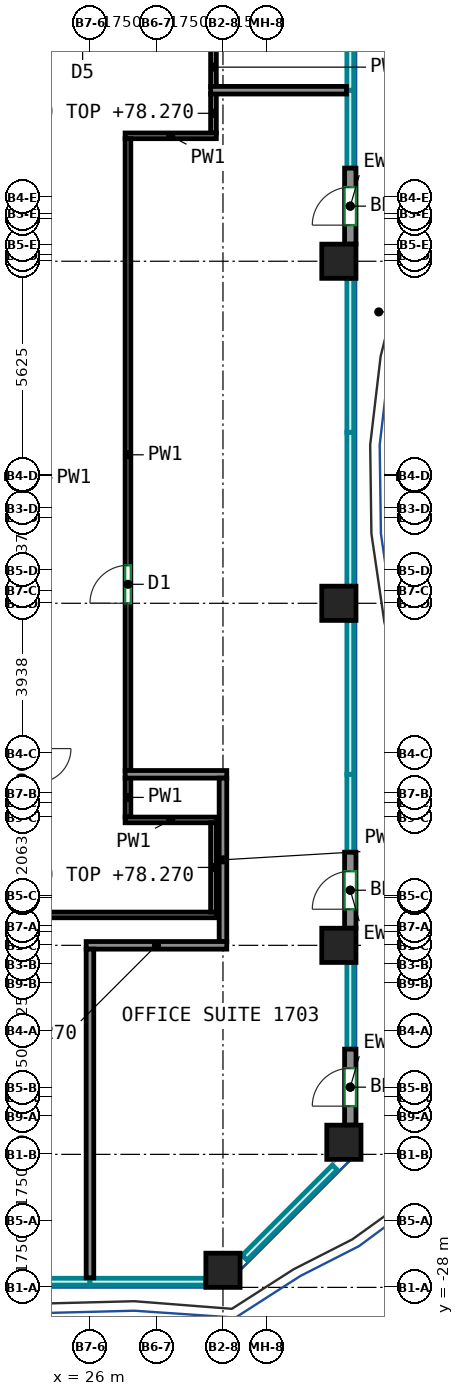
"""IFC4 building model, lengths in metres.
Left out: names, types, materials, properties, quantities, classifications, styles, units other than length and angle.
Written with IfcOpenShell. Run it as: python <this file> out.ifc"""

import sys

from ifc_helpers import new_model, si_unit, direction, frame, frame_2d, origin, origin_2d, place, context, subcontext, project, spatial, rectangle, extrude, source, transform, mapped, element, fill, save


model = new_model("IFC4")
c1 = context("Model", 3, precision=1e-05, world=origin(), true_north=direction((0.0, 1.0)))
c2 = subcontext(c1, "Body", "Model", "MODEL_VIEW")
j1 = project(units=[si_unit("LENGTHUNIT", "METRE"), si_unit("PLANEANGLEUNIT", "RADIAN")], contexts=[c1])
p1 = place(None, origin())
s1 = spatial("IfcSite", under=j1, at=p1, CompositionType="ELEMENT")
p2 = place(p1, origin())
s2 = spatial("IfcBuilding", under=s1, at=p2, CompositionType="ELEMENT")
p3 = place(p2, frame((0.0, 0.0, 75.2)))
s3 = spatial("IfcBuildingStorey", under=s2, at=p3, CompositionType="ELEMENT", Elevation=75.2)
m1 = source(origin(), c2, "Body", "SweptSolid", [
    extrude(rectangle(XDim=0.9, YDim=0.9, at=origin_2d()), origin(), (0.0, 0.0, 1.0), 3.72),
])
for number, where, z_axis, x_axis in (
    (1, (29.5, -27.55, 0.0), (0.0, 0.0, 1.0), (1.0, 0.0, 0.0)),
    (2, (32.55, -19.0, 0.0), (0.0, 0.0, 1.0), (1.0, 0.0, 0.0)),
    (3, (32.55, -10.0, 0.0), (0.0, 0.0, 1.0), (1.0, 0.0, 0.0)),
    (4, (32.55, -1.0, 0.0), (0.0, 0.0, 1.0), (1.0, 0.0, 0.0)),
    (5, (32.682, -24.182, 0.0), (0.0, 0.0, 1.0), (1.0, 0.0, 0.0)),
):
    element("IfcColumn", number, at=place(p3, frame(where, z_axis=z_axis, x_axis=x_axis)), inside=s3, PredefinedType="COLUMN", context=c2, shape_type="MappedRepresentation", body=[
        mapped(m1, transform((0.0, 0.0, 0.0))),
    ])
m2 = source(origin(), c2, "Body", "SweptSolid", [
    extrude(rectangle(XDim=2.0, YDim=0.3, at=frame_2d((1.0, 0.0))), origin(), (0.0, 0.0, 1.0), 3.72),
])
p4 = place(p3, frame((32.85, -23.732, 0.0), z_axis=(0.0, 0.0, 1.0), x_axis=(0.0, 1.0, 0.0)))
e6 = element("IfcWall", 6, at=p4, inside=s3, PredefinedType="SOLIDWALL", context=c2, shape_type="MappedRepresentation", body=[
    mapped(m2, transform((0.0, 0.0, 0.0))),
])
p5 = place(p4, frame((0.5, 0.0, 0.0)))
e7 = element("IfcOpeningElement", 7, at=p5, cuts=e6, PredefinedType="OPENING", context=c2, shape_type="SweptSolid", body=[
    extrude(rectangle(XDim=1.0, YDim=2.1, at=frame_2d((0.5, 1.05))), frame((0.0, 0.16, 0.0), z_axis=(0.0, -1.0, 0.0), x_axis=(1.0, 0.0, 0.0)), (0.0, 0.0, 1.0), 0.32),
])
p6 = place(p3, frame((32.85, -18.55, 0.0), z_axis=(0.0, 0.0, 1.0), x_axis=(0.0, 1.0, 0.0)))
e8 = element("IfcWall", 8, at=p6, inside=s3, PredefinedType="SOLIDWALL", context=c2, shape_type="MappedRepresentation", body=[
    mapped(m2, transform((0.0, 0.0, 0.0))),
])
p7 = place(p6, frame((0.5, 0.0, 0.0)))
e9 = element("IfcOpeningElement", 9, at=p7, cuts=e8, PredefinedType="OPENING", context=c2, shape_type="SweptSolid", body=[
    extrude(rectangle(XDim=1.0, YDim=2.1, at=frame_2d((0.5, 1.05))), frame((0.0, 0.16, 0.0), z_axis=(0.0, -1.0, 0.0), x_axis=(1.0, 0.0, 0.0)), (0.0, 0.0, 1.0), 0.32),
])
p8 = place(p3, frame((32.85, -0.55, 0.0), z_axis=(0.0, 0.0, 1.0), x_axis=(0.0, 1.0, 0.0)))
e10 = element("IfcWall", 10, at=p8, inside=s3, PredefinedType="SOLIDWALL", context=c2, shape_type="MappedRepresentation", body=[
    mapped(m2, transform((0.0, 0.0, 0.0))),
])
p9 = place(p8, frame((0.5, 0.0, 0.0)))
e11 = element("IfcOpeningElement", 11, at=p9, cuts=e10, PredefinedType="OPENING", context=c2, shape_type="SweptSolid", body=[
    extrude(rectangle(XDim=1.0, YDim=2.1, at=frame_2d((0.5, 1.05))), frame((0.0, 0.16, 0.0), z_axis=(0.0, -1.0, 0.0), x_axis=(1.0, 0.0, 0.0)), (0.0, 0.0, 1.0), 0.32),
])
p10 = place(p3, frame((-19.325, -18.2, 0.0), z_axis=(0.0, 0.0, 1.0), x_axis=(1.0, 0.0, 0.0)))
e12 = element("IfcWall", 12, at=p10, inside=s3, PredefinedType="PARTITIONING", context=c2, shape_type="SweptSolid", body=[
    extrude(rectangle(XDim=48.65, YDim=0.15, at=frame_2d((24.325, 0.0))), origin(), (0.0, 0.0, 1.0), 3.72),
])
p11 = place(p10, frame((12.221, 0.0, 0.0)))
e13 = element("IfcOpeningElement", 13, at=p11, cuts=e12, PredefinedType="OPENING", context=c2, shape_type="SweptSolid", body=[
    extrude(rectangle(XDim=0.9, YDim=2.1, at=frame_2d((0.45, 1.05))), frame((0.0, 0.085, 0.0), z_axis=(0.0, -1.0, 0.0), x_axis=(1.0, 0.0, 0.0)), (0.0, 0.0, 1.0), 0.17),
])
p12 = place(p10, frame((26.229, 0.0, 0.0)))
e14 = element("IfcOpeningElement", 14, at=p12, cuts=e12, PredefinedType="OPENING", context=c2, shape_type="SweptSolid", body=[
    extrude(rectangle(XDim=0.9, YDim=2.1, at=frame_2d((0.45, 1.05))), frame((0.0, 0.085, 0.0), z_axis=(0.0, -1.0, 0.0), x_axis=(1.0, 0.0, 0.0)), (0.0, 0.0, 1.0), 0.17),
])
p13 = place(p10, frame((38.029, 0.0, 0.0)))
e15 = element("IfcOpeningElement", 15, at=p13, cuts=e12, PredefinedType="OPENING", context=c2, shape_type="SweptSolid", body=[
    extrude(rectangle(XDim=0.9, YDim=2.1, at=frame_2d((0.45, 1.05))), frame((0.0, 0.085, 0.0), z_axis=(0.0, -1.0, 0.0), x_axis=(1.0, 0.0, 0.0)), (0.0, 0.0, 1.0), 0.17),
])
p14 = place(p3, frame((27.0, -15.625, 0.0), z_axis=(0.0, 0.0, 1.0), x_axis=(0.0, 1.0, 0.0)))
e16 = element("IfcWall", 16, at=p14, inside=s3, PredefinedType="PARTITIONING", context=c2, shape_type="SweptSolid", body=[
    extrude(rectangle(XDim=1.035, YDim=0.15, at=frame_2d((0.518, 0.0))), origin(), (0.0, 0.0, 1.0), 3.72),
])
p15 = place(p3, frame((26.925, -15.7, 0.0), z_axis=(0.0, 0.0, 1.0), x_axis=(1.0, 0.0, 0.0)))
e17 = element("IfcWall", 17, at=p15, inside=s3, PredefinedType="PARTITIONING", context=c2, shape_type="SweptSolid", body=[
    extrude(rectangle(XDim=2.4, YDim=0.15, at=frame_2d((1.2, 0.0))), origin(), (0.0, 0.0, 1.0), 3.72),
])
p16 = place(p3, frame((29.25, -18.125, 0.0), z_axis=(0.0, 0.0, 1.0), x_axis=(0.0, 1.0, 0.0)))
e18 = element("IfcWall", 18, at=p16, inside=s3, PredefinedType="PARTITIONING", context=c2, shape_type="SweptSolid", body=[
    extrude(rectangle(XDim=2.35, YDim=0.15, at=frame_2d((1.175, 0.0))), origin(), (0.0, 0.0, 1.0), 3.07),
])
for number, where, z_axis, x_axis in (
    (19, (29.25, 3.59, 0.0), (0.0, 0.0, 1.0), (0.0, 1.0, 0.0)),
    (20, (29.25, 2.375, 0.0), (0.0, 0.0, 1.0), (0.0, 1.0, 0.0)),
):
    element("IfcWall", number, at=place(p3, frame(where, z_axis=z_axis, x_axis=x_axis)), inside=s3, PredefinedType="PARTITIONING", context=c2, shape_type="SweptSolid", body=[
        extrude(rectangle(XDim=1.035, YDim=0.15, at=frame_2d((0.518, 0.0))), origin(), (0.0, 0.0, 1.0), 3.07),
    ])
p17 = place(p3, frame((26.925, 2.3, 0.0), z_axis=(0.0, 0.0, 1.0), x_axis=(1.0, 0.0, 0.0)))
e21 = element("IfcWall", 21, at=p17, inside=s3, PredefinedType="PARTITIONING", context=c2, shape_type="SweptSolid", body=[
    extrude(rectangle(XDim=2.4, YDim=0.15, at=frame_2d((1.2, 0.0))), origin(), (0.0, 0.0, 1.0), 3.72),
])
p18 = place(p3, frame((27.0, -14.41, 0.0), z_axis=(0.0, 0.0, 1.0), x_axis=(0.0, 1.0, 0.0)))
e22 = element("IfcWall", 22, at=p18, inside=s3, PredefinedType="PARTITIONING", context=c2, shape_type="SweptSolid", body=[
    extrude(rectangle(XDim=16.635, YDim=0.15, at=frame_2d((8.317, 0.0))), origin(), (0.0, 0.0, 1.0), 3.72),
])
p19 = place(p18, frame((4.41, 0.0, 0.0)))
e23 = element("IfcOpeningElement", 23, at=p19, cuts=e22, PredefinedType="OPENING", context=c2, shape_type="SweptSolid", body=[
    extrude(rectangle(XDim=1.0, YDim=2.1, at=frame_2d((0.5, 1.05))), frame((0.0, 0.085, 0.0), z_axis=(0.0, -1.0, 0.0), x_axis=(1.0, 0.0, 0.0)), (0.0, 0.0, 1.0), 0.17),
])
p20 = place(p3, frame((26.926, -14.5, 0.0), z_axis=(0.0, 0.0, 1.0), x_axis=(1.0, 0.0, 0.0)))
e24 = element("IfcWall", 24, at=p20, inside=s3, PredefinedType="PARTITIONING", context=c2, shape_type="SweptSolid", body=[
    extrude(rectangle(XDim=2.674, YDim=0.2, at=frame_2d((1.337, 0.0))), origin(), (0.0, 0.0, 1.0), 3.72),
])
p21 = place(p3, frame((29.5, -18.9, 0.0), z_axis=(0.0, 0.0, 1.0), x_axis=(0.0, 1.0, 0.0)))
e25 = element("IfcWall", 25, at=p21, inside=s3, PredefinedType="PARTITIONING", context=c2, shape_type="SweptSolid", body=[
    extrude(rectangle(XDim=4.3, YDim=0.2, at=frame_2d((2.15, 0.0))), origin(), (0.0, 0.0, 1.0), 3.07),
])
p22 = place(p3, frame((25.9, -19.0, 0.0), z_axis=(0.0, 0.0, 1.0), x_axis=(1.0, 0.0, 0.0)))
e26 = element("IfcWall", 26, at=p22, inside=s3, PredefinedType="PARTITIONING", context=c2, shape_type="SweptSolid", body=[
    extrude(rectangle(XDim=3.7, YDim=0.2, at=frame_2d((1.85, 0.0))), origin(), (0.0, 0.0, 1.0), 3.07),
])
p23 = place(p3, frame((26.0, -27.75, 0.0), z_axis=(0.0, 0.0, 1.0), x_axis=(0.0, 1.0, 0.0)))
e27 = element("IfcWall", 27, at=p23, inside=s3, PredefinedType="PARTITIONING", context=c2, shape_type="SweptSolid", body=[
    extrude(rectangle(XDim=8.65, YDim=0.2, at=frame_2d((4.325, 0.0))), origin(), (0.0, 0.0, 1.0), 3.72),
])
p24 = place(p3, frame((29.176, 3.5, 0.0), z_axis=(0.0, 0.0, 1.0), x_axis=(1.0, 0.0, 0.0)))
e28 = element("IfcWall", 28, at=p24, inside=s3, PredefinedType="PARTITIONING", context=c2, shape_type="SweptSolid", body=[
    extrude(rectangle(XDim=3.574, YDim=0.2, at=frame_2d((1.787, 0.0))), origin(), (0.0, 0.0, 1.0), 3.72),
])
p25 = place(p5, origin())
e29 = element("IfcDoor", 29, at=p25, inside=s3, OperationType="SINGLE_SWING_LEFT", PredefinedType="DOOR", context=c2, shape_type="SweptSolid", body=[
    extrude(rectangle(XDim=1.0, YDim=2.1, at=frame_2d((0.5, 1.05))), frame((0.0, 0.025, 0.0), z_axis=(0.0, -1.0, 0.0), x_axis=(1.0, 0.0, 0.0)), (0.0, 0.0, 1.0), 0.05),
])
fill(e7, e29)
p26 = place(p7, origin())
e30 = element("IfcDoor", 30, at=p26, inside=s3, OperationType="SINGLE_SWING_LEFT", PredefinedType="DOOR", context=c2, shape_type="SweptSolid", body=[
    extrude(rectangle(XDim=1.0, YDim=2.1, at=frame_2d((0.5, 1.05))), frame((0.0, 0.025, 0.0), z_axis=(0.0, -1.0, 0.0), x_axis=(1.0, 0.0, 0.0)), (0.0, 0.0, 1.0), 0.05),
])
fill(e9, e30)
p27 = place(p9, origin())
e31 = element("IfcDoor", 31, at=p27, inside=s3, OperationType="SINGLE_SWING_LEFT", PredefinedType="DOOR", context=c2, shape_type="SweptSolid", body=[
    extrude(rectangle(XDim=1.0, YDim=2.1, at=frame_2d((0.5, 1.05))), frame((0.0, 0.025, 0.0), z_axis=(0.0, -1.0, 0.0), x_axis=(1.0, 0.0, 0.0)), (0.0, 0.0, 1.0), 0.05),
])
fill(e11, e31)
p28 = place(p19, origin())
e32 = element("IfcDoor", 32, at=p28, inside=s3, OperationType="SINGLE_SWING_LEFT", PredefinedType="DOOR", context=c2, shape_type="SweptSolid", body=[
    extrude(rectangle(XDim=1.0, YDim=2.1, at=frame_2d((0.5, 1.05))), frame((0.0, 0.025, 0.0), z_axis=(0.0, -1.0, 0.0), x_axis=(1.0, 0.0, 0.0)), (0.0, 0.0, 1.0), 0.05),
])
fill(e23, e32)
save(model, sys.argv[1])
